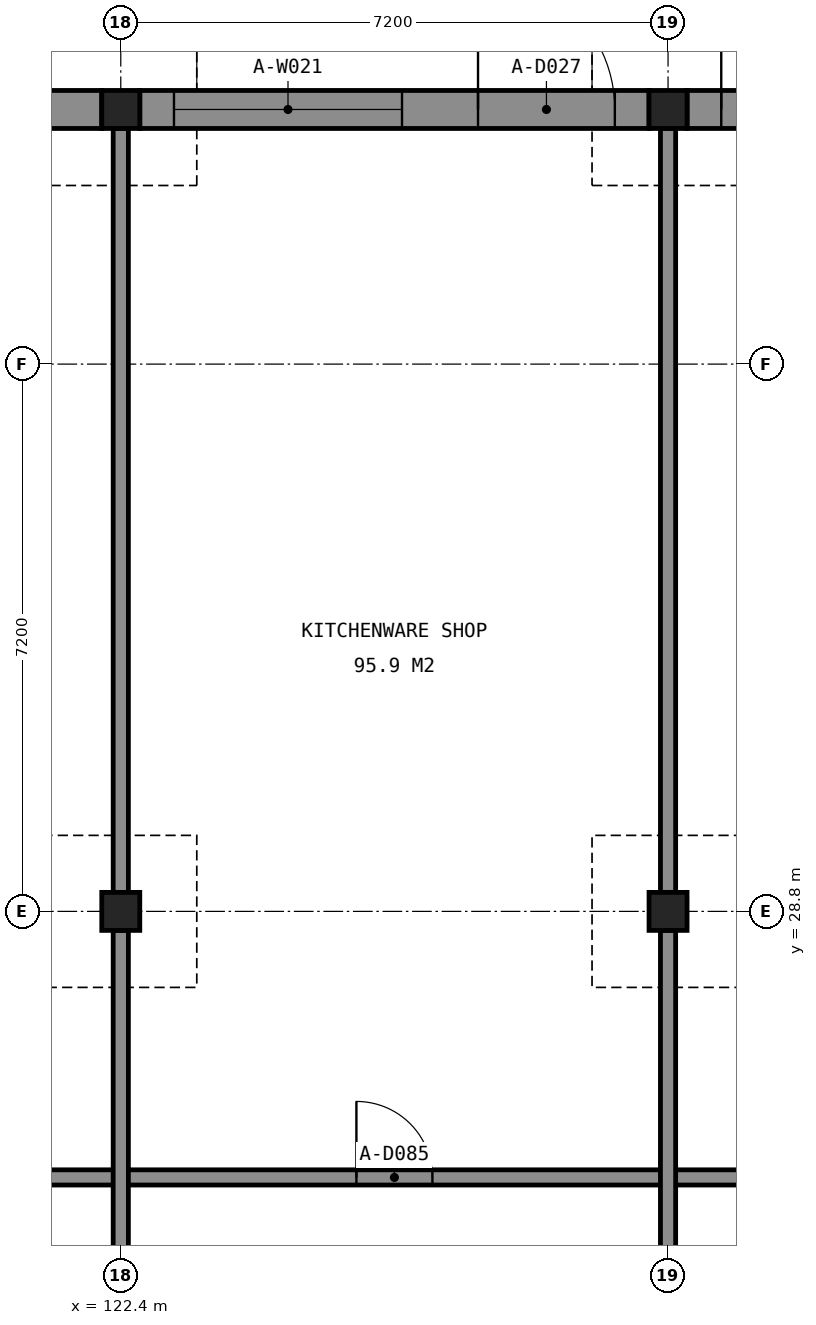
"""IFC4 building model, lengths in metres.
Left out: names, types, materials, properties, quantities, classifications, styles, units other than length and angle.
Written with IfcOpenShell. Run it as: python <this file> out.ifc"""

import sys

from ifc_helpers import new_model, si_unit, direction, frame, frame_2d, origin, origin_2d, place, context, subcontext, project, spatial, rectangle, extrude, element, fill, save


model = new_model("IFC4")
c1 = context("Model", 3, precision=1e-05, world=origin(), true_north=direction((0.0, 1.0)))
c2 = subcontext(c1, "Body", "Model", "MODEL_VIEW")
j1 = project(units=[si_unit("LENGTHUNIT", "METRE"), si_unit("PLANEANGLEUNIT", "RADIAN")], contexts=[c1])
p1 = place(None, origin())
s1 = spatial("IfcSite", under=j1, at=p1, CompositionType="ELEMENT")
p2 = place(p1, origin())
s2 = spatial("IfcBuilding", under=s1, at=p2, CompositionType="ELEMENT")
p3 = place(p2, origin())
s3 = spatial("IfcBuildingStorey", under=s2, at=p3, CompositionType="ELEMENT", Elevation=0.0)
for number, where, z_axis, x_axis in (
    (1, (122.4, 39.35, 0.0), (0.0, 0.0, 1.0), (1.0, 0.0, 0.0)),
    (2, (129.6, 39.35, 0.0), (0.0, 0.0, 1.0), (1.0, 0.0, 0.0)),
    (3, (122.4, 28.8, 0.0), (0.0, 0.0, 1.0), (1.0, 0.0, 0.0)),
    (4, (129.6, 28.8, 0.0), (0.0, 0.0, 1.0), (1.0, 0.0, 0.0)),
):
    element("IfcColumn", number, at=place(p3, frame(where, z_axis=z_axis, x_axis=x_axis)), inside=s3, PredefinedType="COLUMN", context=c2, shape_type="SweptSolid", body=[
        extrude(rectangle(XDim=0.5, YDim=0.5, at=origin_2d()), origin(), (0.0, 0.0, 1.0), 3.7),
    ])
p4 = place(p3, frame((115.45, 39.35, 0.0), z_axis=(0.0, 0.0, 1.0), x_axis=(1.0, 0.0, 0.0)))
e5 = element("IfcWall", 5, at=p4, inside=s3, PredefinedType="SOLIDWALL", context=c2, shape_type="SweptSolid", body=[
    extrude(rectangle(XDim=6.7, YDim=0.5, at=frame_2d((3.35, 0.0))), origin(), (0.0, 0.0, 1.0), 3.6),
])
p5 = place(p4, frame((0.45, 0.0, 0.0)))
e6 = element("IfcOpeningElement", 6, at=p5, cuts=e5, PredefinedType="OPENING", context=c2, shape_type="SweptSolid", body=[
    extrude(rectangle(XDim=1.8, YDim=2.4, at=frame_2d((0.9, 1.2))), frame((0.0, 0.26, 0.0), z_axis=(0.0, -1.0, 0.0), x_axis=(1.0, 0.0, 0.0)), (0.0, 0.0, 1.0), 0.52),
])
p6 = place(p4, frame((2.6, 0.0, 0.6)))
e7 = element("IfcOpeningElement", 7, at=p6, cuts=e5, PredefinedType="OPENING", context=c2, shape_type="SweptSolid", body=[
    extrude(rectangle(XDim=3.0, YDim=2.4, at=frame_2d((1.5, 1.2))), frame((0.0, 0.26, 0.0), z_axis=(0.0, -1.0, 0.0), x_axis=(1.0, 0.0, 0.0)), (0.0, 0.0, 1.0), 0.52),
])
p7 = place(p3, frame((122.65, 39.35, 0.0), z_axis=(0.0, 0.0, 1.0), x_axis=(1.0, 0.0, 0.0)))
e8 = element("IfcWall", 8, at=p7, inside=s3, PredefinedType="SOLIDWALL", context=c2, shape_type="SweptSolid", body=[
    extrude(rectangle(XDim=6.7, YDim=0.5, at=frame_2d((3.35, 0.0))), origin(), (0.0, 0.0, 1.0), 3.6),
])
p8 = place(p7, frame((4.45, 0.0, 0.0)))
e9 = element("IfcOpeningElement", 9, at=p8, cuts=e8, PredefinedType="OPENING", context=c2, shape_type="SweptSolid", body=[
    extrude(rectangle(XDim=1.8, YDim=2.4, at=frame_2d((0.9, 1.2))), frame((0.0, 0.26, 0.0), z_axis=(0.0, -1.0, 0.0), x_axis=(1.0, 0.0, 0.0)), (0.0, 0.0, 1.0), 0.52),
])
p9 = place(p7, frame((0.45, 0.0, 0.6)))
e10 = element("IfcOpeningElement", 10, at=p9, cuts=e8, PredefinedType="OPENING", context=c2, shape_type="SweptSolid", body=[
    extrude(rectangle(XDim=3.0, YDim=2.4, at=frame_2d((1.5, 1.2))), frame((0.0, 0.26, 0.0), z_axis=(0.0, -1.0, 0.0), x_axis=(1.0, 0.0, 0.0)), (0.0, 0.0, 1.0), 0.52),
])
p10 = place(p3, frame((129.85, 39.35, 0.0), z_axis=(0.0, 0.0, 1.0), x_axis=(1.0, 0.0, 0.0)))
e11 = element("IfcWall", 11, at=p10, inside=s3, PredefinedType="SOLIDWALL", context=c2, shape_type="SweptSolid", body=[
    extrude(rectangle(XDim=6.7, YDim=0.5, at=frame_2d((3.35, 0.0))), origin(), (0.0, 0.0, 1.0), 3.6),
])
p11 = place(p10, frame((0.45, 0.0, 0.0)))
e12 = element("IfcOpeningElement", 12, at=p11, cuts=e11, PredefinedType="OPENING", context=c2, shape_type="SweptSolid", body=[
    extrude(rectangle(XDim=1.8, YDim=2.4, at=frame_2d((0.9, 1.2))), frame((0.0, 0.26, 0.0), z_axis=(0.0, -1.0, 0.0), x_axis=(1.0, 0.0, 0.0)), (0.0, 0.0, 1.0), 0.52),
])
p12 = place(p10, frame((2.6, 0.0, 0.6)))
e13 = element("IfcOpeningElement", 13, at=p12, cuts=e11, PredefinedType="OPENING", context=c2, shape_type="SweptSolid", body=[
    extrude(rectangle(XDim=3.0, YDim=2.4, at=frame_2d((1.5, 1.2))), frame((0.0, 0.26, 0.0), z_axis=(0.0, -1.0, 0.0), x_axis=(1.0, 0.0, 0.0)), (0.0, 0.0, 1.0), 0.52),
])
p13 = place(p3, frame((57.7, 25.3, 0.0), z_axis=(0.0, 0.0, 1.0), x_axis=(1.0, 0.0, 0.0)))
e14 = element("IfcWall", 14, at=p13, inside=s3, PredefinedType="PARTITIONING", context=c2, shape_type="SweptSolid", body=[
    extrude(rectangle(XDim=86.2, YDim=0.2, at=frame_2d((43.1, 0.0))), origin(), (0.0, 0.0, 1.0), 3.5),
])
p14 = place(p13, frame((3.0, 0.0, 0.0)))
e15 = element("IfcOpeningElement", 15, at=p14, cuts=e14, PredefinedType="OPENING", context=c2, shape_type="SweptSolid", body=[
    extrude(rectangle(XDim=1.0, YDim=2.1, at=frame_2d((0.5, 1.05))), frame((0.0, 0.11, 0.0), z_axis=(0.0, -1.0, 0.0), x_axis=(1.0, 0.0, 0.0)), (0.0, 0.0, 1.0), 0.22),
])
p15 = place(p13, frame((10.2, 0.0, 0.0)))
e16 = element("IfcOpeningElement", 16, at=p15, cuts=e14, PredefinedType="OPENING", context=c2, shape_type="SweptSolid", body=[
    extrude(rectangle(XDim=1.0, YDim=2.1, at=frame_2d((0.5, 1.05))), frame((0.0, 0.11, 0.0), z_axis=(0.0, -1.0, 0.0), x_axis=(1.0, 0.0, 0.0)), (0.0, 0.0, 1.0), 0.22),
])
p16 = place(p13, frame((17.4, 0.0, 0.0)))
e17 = element("IfcOpeningElement", 17, at=p16, cuts=e14, PredefinedType="OPENING", context=c2, shape_type="SweptSolid", body=[
    extrude(rectangle(XDim=1.0, YDim=2.1, at=frame_2d((0.5, 1.05))), frame((0.0, 0.11, 0.0), z_axis=(0.0, -1.0, 0.0), x_axis=(1.0, 0.0, 0.0)), (0.0, 0.0, 1.0), 0.22),
])
p17 = place(p13, frame((24.6, 0.0, 0.0)))
e18 = element("IfcOpeningElement", 18, at=p17, cuts=e14, PredefinedType="OPENING", context=c2, shape_type="SweptSolid", body=[
    extrude(rectangle(XDim=1.0, YDim=2.1, at=frame_2d((0.5, 1.05))), frame((0.0, 0.11, 0.0), z_axis=(0.0, -1.0, 0.0), x_axis=(1.0, 0.0, 0.0)), (0.0, 0.0, 1.0), 0.22),
])
p18 = place(p13, frame((31.8, 0.0, 0.0)))
e19 = element("IfcOpeningElement", 19, at=p18, cuts=e14, PredefinedType="OPENING", context=c2, shape_type="SweptSolid", body=[
    extrude(rectangle(XDim=1.0, YDim=2.1, at=frame_2d((0.5, 1.05))), frame((0.0, 0.11, 0.0), z_axis=(0.0, -1.0, 0.0), x_axis=(1.0, 0.0, 0.0)), (0.0, 0.0, 1.0), 0.22),
])
p19 = place(p13, frame((39.0, 0.0, 0.0)))
e20 = element("IfcOpeningElement", 20, at=p19, cuts=e14, PredefinedType="OPENING", context=c2, shape_type="SweptSolid", body=[
    extrude(rectangle(XDim=1.0, YDim=2.1, at=frame_2d((0.5, 1.05))), frame((0.0, 0.11, 0.0), z_axis=(0.0, -1.0, 0.0), x_axis=(1.0, 0.0, 0.0)), (0.0, 0.0, 1.0), 0.22),
])
p20 = place(p13, frame((46.2, 0.0, 0.0)))
e21 = element("IfcOpeningElement", 21, at=p20, cuts=e14, PredefinedType="OPENING", context=c2, shape_type="SweptSolid", body=[
    extrude(rectangle(XDim=1.0, YDim=2.1, at=frame_2d((0.5, 1.05))), frame((0.0, 0.11, 0.0), z_axis=(0.0, -1.0, 0.0), x_axis=(1.0, 0.0, 0.0)), (0.0, 0.0, 1.0), 0.22),
])
p21 = place(p13, frame((53.4, 0.0, 0.0)))
e22 = element("IfcOpeningElement", 22, at=p21, cuts=e14, PredefinedType="OPENING", context=c2, shape_type="SweptSolid", body=[
    extrude(rectangle(XDim=1.0, YDim=2.1, at=frame_2d((0.5, 1.05))), frame((0.0, 0.11, 0.0), z_axis=(0.0, -1.0, 0.0), x_axis=(1.0, 0.0, 0.0)), (0.0, 0.0, 1.0), 0.22),
])
p22 = place(p13, frame((60.6, 0.0, 0.0)))
e23 = element("IfcOpeningElement", 23, at=p22, cuts=e14, PredefinedType="OPENING", context=c2, shape_type="SweptSolid", body=[
    extrude(rectangle(XDim=1.0, YDim=2.1, at=frame_2d((0.5, 1.05))), frame((0.0, 0.11, 0.0), z_axis=(0.0, -1.0, 0.0), x_axis=(1.0, 0.0, 0.0)), (0.0, 0.0, 1.0), 0.22),
])
p23 = place(p13, frame((67.8, 0.0, 0.0)))
e24 = element("IfcOpeningElement", 24, at=p23, cuts=e14, PredefinedType="OPENING", context=c2, shape_type="SweptSolid", body=[
    extrude(rectangle(XDim=1.0, YDim=2.1, at=frame_2d((0.5, 1.05))), frame((0.0, 0.11, 0.0), z_axis=(0.0, -1.0, 0.0), x_axis=(1.0, 0.0, 0.0)), (0.0, 0.0, 1.0), 0.22),
])
p24 = place(p13, frame((75.0, 0.0, 0.0)))
e25 = element("IfcOpeningElement", 25, at=p24, cuts=e14, PredefinedType="OPENING", context=c2, shape_type="SweptSolid", body=[
    extrude(rectangle(XDim=1.0, YDim=2.1, at=frame_2d((0.5, 1.05))), frame((0.0, 0.11, 0.0), z_axis=(0.0, -1.0, 0.0), x_axis=(1.0, 0.0, 0.0)), (0.0, 0.0, 1.0), 0.22),
])
p25 = place(p13, frame((84.65, 0.0, 0.0)))
e26 = element("IfcOpeningElement", 26, at=p25, cuts=e14, PredefinedType="OPENING", context=c2, shape_type="SweptSolid", body=[
    extrude(rectangle(XDim=0.9, YDim=2.1, at=frame_2d((0.45, 1.05))), frame((0.0, 0.11, 0.0), z_axis=(0.0, -1.0, 0.0), x_axis=(1.0, 0.0, 0.0)), (0.0, 0.0, 1.0), 0.22),
])
p26 = place(p3, frame((122.4, 20.6, 0.0), z_axis=(0.0, 0.0, 1.0), x_axis=(0.0, 1.0, 0.0)))
e27 = element("IfcWall", 27, at=p26, inside=s3, PredefinedType="PARTITIONING", context=c2, shape_type="SweptSolid", body=[
    extrude(rectangle(XDim=7.95, YDim=0.2, at=frame_2d((3.975, 0.0))), origin(), (0.0, 0.0, 1.0), 3.5),
])
p27 = place(p3, frame((122.4, 29.05, 0.0), z_axis=(0.0, 0.0, 1.0), x_axis=(0.0, 1.0, 0.0)))
e28 = element("IfcWall", 28, at=p27, inside=s3, PredefinedType="PARTITIONING", context=c2, shape_type="SweptSolid", body=[
    extrude(rectangle(XDim=10.05, YDim=0.2, at=frame_2d((5.025, 0.0))), origin(), (0.0, 0.0, 1.0), 3.5),
])
p28 = place(p3, frame((129.6, 20.6, 0.0), z_axis=(0.0, 0.0, 1.0), x_axis=(0.0, 1.0, 0.0)))
e29 = element("IfcWall", 29, at=p28, inside=s3, PredefinedType="PARTITIONING", context=c2, shape_type="SweptSolid", body=[
    extrude(rectangle(XDim=7.95, YDim=0.2, at=frame_2d((3.975, 0.0))), origin(), (0.0, 0.0, 1.0), 3.5),
])
p29 = place(p3, frame((129.6, 29.05, 0.0), z_axis=(0.0, 0.0, 1.0), x_axis=(0.0, 1.0, 0.0)))
e30 = element("IfcWall", 30, at=p29, inside=s3, PredefinedType="PARTITIONING", context=c2, shape_type="SweptSolid", body=[
    extrude(rectangle(XDim=10.05, YDim=0.2, at=frame_2d((5.025, 0.0))), origin(), (0.0, 0.0, 1.0), 3.5),
])
p30 = place(p8, origin())
e31 = element("IfcDoor", 31, at=p30, inside=s3, OperationType="DOUBLE_DOOR_DOUBLE_SWING", PredefinedType="DOOR", context=c2, shape_type="SweptSolid", body=[
    extrude(rectangle(XDim=1.8, YDim=2.4, at=frame_2d((0.9, 1.2))), frame((0.0, 0.025, 0.0), z_axis=(0.0, -1.0, 0.0), x_axis=(1.0, 0.0, 0.0)), (0.0, 0.0, 1.0), 0.05),
])
fill(e9, e31)
p31 = place(p9, origin())
e32 = element("IfcWindow", 32, at=p31, inside=s3, PartitioningType="SINGLE_PANEL", PredefinedType="WINDOW", context=c2, shape_type="SweptSolid", body=[
    extrude(rectangle(XDim=3.0, YDim=2.4, at=frame_2d((1.5, 1.2))), frame((0.0, 0.03, 0.0), z_axis=(0.0, -1.0, 0.0), x_axis=(1.0, 0.0, 0.0)), (0.0, 0.0, 1.0), 0.06),
])
fill(e10, e32)
p32 = place(p11, origin())
e33 = element("IfcDoor", 33, at=p32, inside=s3, OperationType="DOUBLE_DOOR_DOUBLE_SWING", PredefinedType="DOOR", context=c2, shape_type="SweptSolid", body=[
    extrude(rectangle(XDim=1.8, YDim=2.4, at=frame_2d((0.9, 1.2))), frame((0.0, 0.025, 0.0), z_axis=(0.0, -1.0, 0.0), x_axis=(1.0, 0.0, 0.0)), (0.0, 0.0, 1.0), 0.05),
])
fill(e12, e33)
p33 = place(p23, origin())
e34 = element("IfcDoor", 34, at=p33, inside=s3, OperationType="SINGLE_SWING_LEFT", PredefinedType="DOOR", context=c2, shape_type="SweptSolid", body=[
    extrude(rectangle(XDim=1.0, YDim=2.1, at=frame_2d((0.5, 1.05))), frame((0.0, 0.025, 0.0), z_axis=(0.0, -1.0, 0.0), x_axis=(1.0, 0.0, 0.0)), (0.0, 0.0, 1.0), 0.05),
])
fill(e24, e34)
save(model, sys.argv[1])
